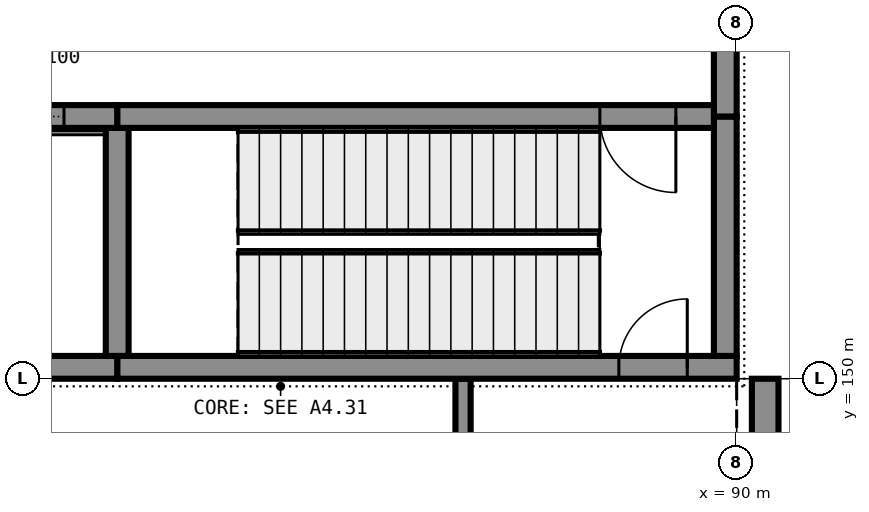
"""IFC4 building model, lengths in metres.
Left out: names, types, materials, properties, quantities, classifications, styles, units other than length and angle.
Written with IfcOpenShell. Run it as: python <this file> out.ifc"""

import sys

from ifc_helpers import new_model, si_unit, direction, frame, frame_2d, origin, place, context, subcontext, project, spatial, rectangle, extrude, element, fill, save


model = new_model("IFC4")
c1 = context("Model", 3, precision=1e-05, world=origin(), true_north=direction((0.0, 1.0)))
c2 = subcontext(c1, "Body", "Model", "MODEL_VIEW")
j1 = project(units=[si_unit("LENGTHUNIT", "METRE"), si_unit("PLANEANGLEUNIT", "RADIAN")], contexts=[c1])
p1 = place(None, origin())
s1 = spatial("IfcSite", under=j1, at=p1, CompositionType="ELEMENT")
p2 = place(p1, origin())
s2 = spatial("IfcBuilding", under=s1, at=p2, CompositionType="ELEMENT")
p3 = place(p2, frame((0.0, 0.0, 6.0)))
s3 = spatial("IfcBuildingStorey", under=s2, at=p3, CompositionType="ELEMENT", Elevation=6.0)
p4 = place(p3, frame((90.0, 150.15, 0.0), z_axis=(0.0, 0.0, 1.0), x_axis=(-1.0, 0.0, 0.0)))
e1 = element("IfcWall", 1, at=p4, inside=s3, PredefinedType="SHEAR", context=c2, shape_type="SweptSolid", body=[
    extrude(rectangle(XDim=8.15, YDim=0.3, at=frame_2d((4.075, 0.0))), origin(), (0.0, 0.0, 1.0), 5.75),
])
p5 = place(p4, frame((0.65, 0.0, 0.0)))
e2 = element("IfcOpeningElement", 2, at=p5, cuts=e1, PredefinedType="OPENING", context=c2, shape_type="SweptSolid", body=[
    extrude(rectangle(XDim=0.9, YDim=2.1, at=frame_2d((0.45, 1.05))), frame((0.0, 0.16, 0.0), z_axis=(0.0, -1.0, 0.0), x_axis=(1.0, 0.0, 0.0)), (0.0, 0.0, 1.0), 0.32),
])
p6 = place(p3, frame((81.85, 150.15, 0.0), z_axis=(0.0, 0.0, 1.0), x_axis=(-1.0, 0.0, 0.0)))
e3 = element("IfcWall", 3, at=p6, inside=s3, PredefinedType="SHEAR", context=c2, shape_type="SweptSolid", body=[
    extrude(rectangle(XDim=2.5, YDim=0.3, at=frame_2d((1.25, 0.0))), origin(), (0.0, 0.0, 1.0), 5.75),
])
p7 = place(p3, frame((89.7, 153.45, 0.0), z_axis=(0.0, 0.0, 1.0), x_axis=(-1.0, 0.0, 0.0)))
e4 = element("IfcWall", 4, at=p7, inside=s3, PredefinedType="SHEAR", context=c2, shape_type="SweptSolid", body=[
    extrude(rectangle(XDim=7.85, YDim=0.3, at=frame_2d((3.925, 0.0))), origin(), (0.0, 0.0, 1.0), 5.75),
])
p8 = place(p7, frame((0.5, 0.0, 0.0)))
e5 = element("IfcOpeningElement", 5, at=p8, cuts=e4, PredefinedType="OPENING", context=c2, shape_type="SweptSolid", body=[
    extrude(rectangle(XDim=1.0, YDim=2.1, at=frame_2d((0.5, 1.05))), frame((0.0, 0.16, 0.0), z_axis=(0.0, -1.0, 0.0), x_axis=(1.0, 0.0, 0.0)), (0.0, 0.0, 1.0), 0.32),
])
p9 = place(p3, frame((81.85, 153.45, 0.0), z_axis=(0.0, 0.0, 1.0), x_axis=(-1.0, 0.0, 0.0)))
e6 = element("IfcWall", 6, at=p9, inside=s3, PredefinedType="SHEAR", context=c2, shape_type="SweptSolid", body=[
    extrude(rectangle(XDim=2.5, YDim=0.3, at=frame_2d((1.25, 0.0))), origin(), (0.0, 0.0, 1.0), 5.75),
])
p10 = place(p9, frame((0.7, 0.0, 0.0)))
e7 = element("IfcOpeningElement", 7, at=p10, cuts=e6, PredefinedType="OPENING", context=c2, shape_type="SweptSolid", body=[
    extrude(rectangle(XDim=1.1, YDim=2.1, at=frame_2d((0.55, 1.05))), frame((0.0, 0.16, 0.0), z_axis=(0.0, -1.0, 0.0), x_axis=(1.0, 0.0, 0.0)), (0.0, 0.0, 1.0), 0.32),
])
p11 = place(p3, frame((89.85, 150.3, 0.0), z_axis=(0.0, 0.0, 1.0), x_axis=(0.0, 1.0, 0.0)))
e8 = element("IfcWall", 8, at=p11, inside=s3, PredefinedType="SHEAR", context=c2, shape_type="SweptSolid", body=[
    extrude(rectangle(XDim=3.15, YDim=0.3, at=frame_2d((1.575, 0.0))), origin(), (0.0, 0.0, 1.0), 5.75),
])
p12 = place(p3, frame((89.85, 153.45, 0.0), z_axis=(0.0, 0.0, 1.0), x_axis=(0.0, 1.0, 0.0)))
e9 = element("IfcWall", 9, at=p12, inside=s3, PredefinedType="SHEAR", context=c2, shape_type="SweptSolid", body=[
    extrude(rectangle(XDim=5.1, YDim=0.3, at=frame_2d((2.55, 0.0))), origin(), (0.0, 0.0, 1.0), 5.75),
])
p13 = place(p3, frame((81.85, 150.3, 0.0), z_axis=(0.0, 0.0, 1.0), x_axis=(0.0, 1.0, 0.0)))
e10 = element("IfcWall", 10, at=p13, inside=s3, PredefinedType="SHEAR", context=c2, shape_type="SweptSolid", body=[
    extrude(rectangle(XDim=3.0, YDim=0.3, at=frame_2d((1.5, 0.0))), origin(), (0.0, 0.0, 1.0), 5.75),
])
p14 = place(p3, frame((90.375, 138.5, 0.0), z_axis=(0.0, 0.0, 1.0), x_axis=(0.0, 1.0, 0.0)))
e11 = element("IfcWall", 11, at=p14, inside=s3, PredefinedType="STANDARD", context=c2, shape_type="SweptSolid", body=[
    extrude(rectangle(XDim=11.5, YDim=0.35, at=frame_2d((5.75, 0.0))), origin(), (0.0, 0.0, 1.0), 6.0),
])
p15 = place(p14, frame((4.55, 0.0, 0.9)))
e12 = element("IfcOpeningElement", 12, at=p15, cuts=e11, PredefinedType="OPENING", context=c2, shape_type="SweptSolid", body=[
    extrude(rectangle(XDim=2.4, YDim=1.8, at=frame_2d((1.2, 0.9))), frame((0.0, 0.185, 0.0), z_axis=(0.0, -1.0, 0.0), x_axis=(1.0, 0.0, 0.0)), (0.0, 0.0, 1.0), 0.37),
])
p16 = place(p3, frame((86.4, 114.0, 0.0), z_axis=(0.0, 0.0, 1.0), x_axis=(0.0, 1.0, 0.0)))
e13 = element("IfcWall", 13, at=p16, inside=s3, PredefinedType="PARTITIONING", context=c2, shape_type="SweptSolid", body=[
    extrude(rectangle(XDim=36.0, YDim=0.2, at=frame_2d((18.0, 0.0))), origin(), (0.0, 0.0, 1.0), 5.75),
])
p17 = place(p16, frame((2.5, 0.0, 0.0)))
e14 = element("IfcOpeningElement", 14, at=p17, cuts=e13, PredefinedType="OPENING", context=c2, shape_type="SweptSolid", body=[
    extrude(rectangle(XDim=1.0, YDim=2.1, at=frame_2d((0.5, 1.05))), frame((0.0, 0.11, 0.0), z_axis=(0.0, -1.0, 0.0), x_axis=(1.0, 0.0, 0.0)), (0.0, 0.0, 1.0), 0.22),
])
p18 = place(p16, frame((8.5, 0.0, 0.0)))
e15 = element("IfcOpeningElement", 15, at=p18, cuts=e13, PredefinedType="OPENING", context=c2, shape_type="SweptSolid", body=[
    extrude(rectangle(XDim=1.0, YDim=2.1, at=frame_2d((0.5, 1.05))), frame((0.0, 0.11, 0.0), z_axis=(0.0, -1.0, 0.0), x_axis=(1.0, 0.0, 0.0)), (0.0, 0.0, 1.0), 0.22),
])
p19 = place(p16, frame((14.5, 0.0, 0.0)))
e16 = element("IfcOpeningElement", 16, at=p19, cuts=e13, PredefinedType="OPENING", context=c2, shape_type="SweptSolid", body=[
    extrude(rectangle(XDim=1.0, YDim=2.1, at=frame_2d((0.5, 1.05))), frame((0.0, 0.11, 0.0), z_axis=(0.0, -1.0, 0.0), x_axis=(1.0, 0.0, 0.0)), (0.0, 0.0, 1.0), 0.22),
])
p20 = place(p16, frame((20.5, 0.0, 0.0)))
e17 = element("IfcOpeningElement", 17, at=p20, cuts=e13, PredefinedType="OPENING", context=c2, shape_type="SweptSolid", body=[
    extrude(rectangle(XDim=1.0, YDim=2.1, at=frame_2d((0.5, 1.05))), frame((0.0, 0.11, 0.0), z_axis=(0.0, -1.0, 0.0), x_axis=(1.0, 0.0, 0.0)), (0.0, 0.0, 1.0), 0.22),
])
p21 = place(p16, frame((26.5, 0.0, 0.0)))
e18 = element("IfcOpeningElement", 18, at=p21, cuts=e13, PredefinedType="OPENING", context=c2, shape_type="SweptSolid", body=[
    extrude(rectangle(XDim=1.0, YDim=2.1, at=frame_2d((0.5, 1.05))), frame((0.0, 0.11, 0.0), z_axis=(0.0, -1.0, 0.0), x_axis=(1.0, 0.0, 0.0)), (0.0, 0.0, 1.0), 0.22),
])
p22 = place(p16, frame((32.5, 0.0, 0.0)))
e19 = element("IfcOpeningElement", 19, at=p22, cuts=e13, PredefinedType="OPENING", context=c2, shape_type="SweptSolid", body=[
    extrude(rectangle(XDim=1.0, YDim=2.1, at=frame_2d((0.5, 1.05))), frame((0.0, 0.11, 0.0), z_axis=(0.0, -1.0, 0.0), x_axis=(1.0, 0.0, 0.0)), (0.0, 0.0, 1.0), 0.22),
])
p23 = place(p5, frame((0.9, 0.0, 0.0), z_axis=(0.0, 0.0, 1.0), x_axis=(-1.0, 0.0, 0.0)))
e20 = element("IfcDoor", 20, at=p23, inside=s3, OperationType="SINGLE_SWING_LEFT", PredefinedType="DOOR", context=c2, shape_type="SweptSolid", body=[
    extrude(rectangle(XDim=0.9, YDim=2.1, at=frame_2d((0.45, 1.05))), frame((0.0, 0.025, 0.0), z_axis=(0.0, -1.0, 0.0), x_axis=(1.0, 0.0, 0.0)), (0.0, 0.0, 1.0), 0.05),
])
fill(e2, e20)
p24 = place(p10, origin())
e21 = element("IfcDoor", 21, at=p24, inside=s3, OperationType="SLIDING_TO_LEFT", PredefinedType="DOOR", context=c2, shape_type="SweptSolid", body=[
    extrude(rectangle(XDim=1.1, YDim=2.1, at=frame_2d((0.55, 1.05))), frame((0.0, 0.025, 0.0), z_axis=(0.0, -1.0, 0.0), x_axis=(1.0, 0.0, 0.0)), (0.0, 0.0, 1.0), 0.05),
])
fill(e7, e21)
p25 = place(p8, origin())
e22 = element("IfcDoor", 22, at=p25, inside=s3, OperationType="SINGLE_SWING_RIGHT", PredefinedType="DOOR", context=c2, shape_type="SweptSolid", body=[
    extrude(rectangle(XDim=1.0, YDim=2.1, at=frame_2d((0.5, 1.05))), frame((0.0, 0.025, 0.0), z_axis=(0.0, -1.0, 0.0), x_axis=(1.0, 0.0, 0.0)), (0.0, 0.0, 1.0), 0.05),
])
fill(e5, e22)
save(model, sys.argv[1])
